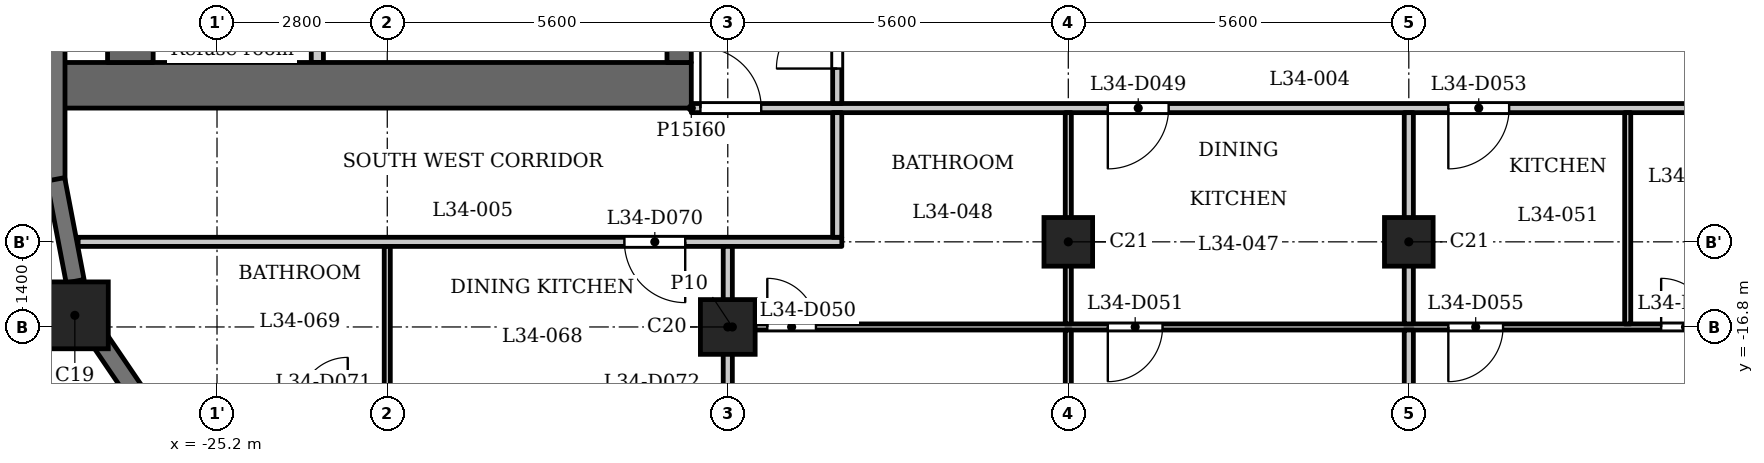
"""IFC4 building model, lengths in metres.
Left out: names, types, materials, properties, quantities, classifications, styles, units other than length and angle.
Written with IfcOpenShell. Run it as: python <this file> out.ifc"""

import sys

from ifc_helpers import new_model, si_unit, direction, frame, frame_2d, origin, origin_2d, place, context, subcontext, project, spatial, rectangle, extrude, element, fill, save


model = new_model("IFC4")
c1 = context("Model", 3, precision=1e-05, world=origin(), true_north=direction((0.0, 1.0)))
c2 = subcontext(c1, "Body", "Model", "MODEL_VIEW")
j1 = project(units=[si_unit("LENGTHUNIT", "METRE"), si_unit("PLANEANGLEUNIT", "RADIAN")], contexts=[c1])
p1 = place(None, origin())
s1 = spatial("IfcSite", under=j1, at=p1, CompositionType="ELEMENT")
p2 = place(p1, origin())
s2 = spatial("IfcBuilding", under=s1, at=p2, CompositionType="ELEMENT")
p3 = place(p2, frame((0.0, 0.0, 136.1)))
s3 = spatial("IfcBuildingStorey", under=s2, at=p3, CompositionType="ELEMENT", Elevation=136.1)
p4 = place(p3, frame((-27.538, -16.609, 0.0), z_axis=(0.0, 0.0, 1.0), x_axis=(1.0, 0.0, 0.0)))
e1 = element("IfcColumn", 1, at=p4, inside=s3, PredefinedType="COLUMN", context=c2, shape_type="SweptSolid", body=[
    extrude(rectangle(XDim=1.1, YDim=1.1, at=origin_2d()), origin(), (0.0, 0.0, 1.0), 3.5),
])
p5 = place(p3, frame((-16.8, -16.8, 0.0), z_axis=(0.0, 0.0, 1.0), x_axis=(1.0, 0.0, 0.0)))
e2 = element("IfcColumn", 2, at=p5, inside=s3, PredefinedType="COLUMN", context=c2, shape_type="SweptSolid", body=[
    extrude(rectangle(XDim=0.9, YDim=0.9, at=origin_2d()), origin(), (0.0, 0.0, 1.0), 3.5),
])
for number, where, z_axis, x_axis in (
    (3, (-11.2, -15.4, 0.0), (0.0, 0.0, 1.0), (1.0, 0.0, 0.0)),
    (4, (-5.6, -15.4, 0.0), (0.0, 0.0, 1.0), (1.0, 0.0, 0.0)),
):
    element("IfcColumn", number, at=place(p3, frame(where, z_axis=z_axis, x_axis=x_axis)), inside=s3, PredefinedType="COLUMN", context=c2, shape_type="SweptSolid", body=[
        extrude(rectangle(XDim=0.8, YDim=0.8, at=origin_2d()), origin(), (0.0, 0.0, 1.0), 3.5),
    ])
p6 = place(p3, frame((-27.85, -11.75, 0.0), z_axis=(0.0, 0.0, 1.0), x_axis=(0.0, -1.0, 0.0)))
e5 = element("IfcWall", 5, at=p6, inside=s3, PredefinedType="SOLIDWALL", context=c2, shape_type="SweptSolid", body=[
    extrude(rectangle(XDim=2.65, YDim=0.3, at=frame_2d((1.325, 0.0))), origin(), (0.0, 0.0, 1.0), 2.45),
])
p7 = place(p3, frame((-27.853, -14.372, 0.0), z_axis=(0.0, 0.0, 1.0), x_axis=(0.187302784601, -0.982302227871, 0.0)))
e6 = element("IfcWall", 6, at=p7, inside=s3, PredefinedType="SOLIDWALL", context=c2, shape_type="SweptSolid", body=[
    extrude(rectangle(XDim=1.706, YDim=0.3, at=frame_2d((0.853, 0.0))), origin(), (0.0, 0.0, 1.0), 2.45),
])
p8 = place(p3, frame((-27.138, -17.002, 0.0), z_axis=(0.0, 0.0, 1.0), x_axis=(0.562075160946, -0.827086158419, 0.0)))
e7 = element("IfcWall", 7, at=p8, inside=s3, PredefinedType="SOLIDWALL", context=c2, shape_type="SweptSolid", body=[
    extrude(rectangle(XDim=1.706, YDim=0.3, at=frame_2d((0.853, 0.0))), origin(), (0.0, 0.0, 1.0), 2.45),
])
p9 = place(p3, frame((-17.4, -12.825, 0.0), z_axis=(0.0, 0.0, 1.0), x_axis=(-1.0, 0.0, 0.0)))
e8 = element("IfcWall", 8, at=p9, inside=s3, PredefinedType="SHEAR", context=c2, shape_type="SweptSolid", body=[
    extrude(rectangle(XDim=10.4, YDim=0.75, at=frame_2d((5.2, 0.0))), origin(), (0.0, 0.0, 1.0), 3.2),
])
p10 = place(p3, frame((-17.6, -12.45, 0.0), z_axis=(0.0, 0.0, 1.0), x_axis=(0.0, 1.0, 0.0)))
e9 = element("IfcWall", 9, at=p10, inside=s3, PredefinedType="SHEAR", context=c2, shape_type="SweptSolid", body=[
    extrude(rectangle(XDim=24.9, YDim=0.4, at=frame_2d((12.45, 0.0))), origin(), (0.0, 0.0, 1.0), 3.2),
])
p11 = place(p10, frame((8.65, 0.0, 0.0)))
e10 = element("IfcOpeningElement", 10, at=p11, cuts=e9, PredefinedType="OPENING", context=c2, shape_type="SweptSolid", body=[
    extrude(rectangle(XDim=0.9, YDim=2.1, at=frame_2d((0.45, 1.05))), frame((0.0, 0.21, 0.0), z_axis=(0.0, -1.0, 0.0), x_axis=(1.0, 0.0, 0.0)), (0.0, 0.0, 1.0), 0.42),
])
p12 = place(p10, frame((15.6, 0.0, 0.0)))
e11 = element("IfcOpeningElement", 11, at=p12, cuts=e9, PredefinedType="OPENING", context=c2, shape_type="SweptSolid", body=[
    extrude(rectangle(XDim=1.1, YDim=2.1, at=frame_2d((0.55, 1.05))), frame((0.0, 0.21, 0.0), z_axis=(0.0, -1.0, 0.0), x_axis=(1.0, 0.0, 0.0)), (0.0, 0.0, 1.0), 0.42),
])
p13 = place(p10, frame((18.0, 0.0, 0.0)))
e12 = element("IfcOpeningElement", 12, at=p13, cuts=e9, PredefinedType="OPENING", context=c2, shape_type="SweptSolid", body=[
    extrude(rectangle(XDim=1.1, YDim=2.1, at=frame_2d((0.55, 1.05))), frame((0.0, 0.21, 0.0), z_axis=(0.0, -1.0, 0.0), x_axis=(1.0, 0.0, 0.0)), (0.0, 0.0, 1.0), 0.42),
])
p14 = place(p10, frame((23.025, 0.0, 0.0)))
e13 = element("IfcOpeningElement", 13, at=p14, cuts=e9, PredefinedType="OPENING", context=c2, shape_type="SweptSolid", body=[
    extrude(rectangle(XDim=1.1, YDim=2.1, at=frame_2d((0.55, 1.05))), frame((0.0, 0.21, 0.0), z_axis=(0.0, -1.0, 0.0), x_axis=(1.0, 0.0, 0.0)), (0.0, 0.0, 1.0), 0.42),
])
p15 = place(p10, frame((0.775, 0.0, 0.0)))
e14 = element("IfcOpeningElement", 14, at=p15, cuts=e9, PredefinedType="OPENING", context=c2, shape_type="SweptSolid", body=[
    extrude(rectangle(XDim=1.1, YDim=2.1, at=frame_2d((0.55, 1.05))), frame((0.0, 0.21, 0.0), z_axis=(0.0, -1.0, 0.0), x_axis=(1.0, 0.0, 0.0)), (0.0, 0.0, 1.0), 0.42),
])
p16 = place(p10, frame((12.925, 0.0, 0.0)))
e15 = element("IfcOpeningElement", 15, at=p16, cuts=e9, PredefinedType="OPENING", context=c2, shape_type="SweptSolid", body=[
    extrude(rectangle(XDim=1.8, YDim=2.1, at=frame_2d((0.9, 1.05))), frame((0.0, 0.21, 0.0), z_axis=(0.0, -1.0, 0.0), x_axis=(1.0, 0.0, 0.0)), (0.0, 0.0, 1.0), 0.42),
])
p17 = place(p3, frame((-26.625, -12.45, 0.0), z_axis=(0.0, 0.0, 1.0), x_axis=(0.0, 1.0, 0.0)))
e16 = element("IfcWall", 16, at=p17, inside=s3, PredefinedType="SHEAR", context=c2, shape_type="SweptSolid", body=[
    extrude(rectangle(XDim=24.9, YDim=0.75, at=frame_2d((12.45, 0.0))), origin(), (0.0, 0.0, 1.0), 3.2),
])
p18 = place(p3, frame((-23.55, -12.45, 0.0), z_axis=(0.0, 0.0, 1.0), x_axis=(0.0, 1.0, 0.0)))
e17 = element("IfcWall", 17, at=p18, inside=s3, PredefinedType="PARTITIONING", context=c2, shape_type="SweptSolid", body=[
    extrude(rectangle(XDim=2.65, YDim=0.2, at=frame_2d((1.325, 0.0))), origin(), (0.0, 0.0, 1.0), 3.2),
])
p19 = place(p18, frame((0.875, 0.0, 0.0)))
e18 = element("IfcOpeningElement", 18, at=p19, cuts=e17, PredefinedType="OPENING", context=c2, shape_type="SweptSolid", body=[
    extrude(rectangle(XDim=0.9, YDim=2.1, at=frame_2d((0.45, 1.05))), frame((0.0, 0.11, 0.0), z_axis=(0.0, -1.0, 0.0), x_axis=(1.0, 0.0, 0.0)), (0.0, 0.0, 1.0), 0.22),
])
p20 = place(p3, frame((-16.725, -16.8, 0.0), z_axis=(0.0, 0.0, 1.0), x_axis=(1.0, 0.0, 0.0)))
e19 = element("IfcWall", 19, at=p20, inside=s3, PredefinedType="PARTITIONING", context=c2, shape_type="SweptSolid", body=[
    extrude(rectangle(XDim=33.45, YDim=0.1, at=frame_2d((16.725, 0.0))), origin(), (0.0, 0.0, 1.0), 3.2),
])
p21 = place(p20, frame((0.575, 0.0, 0.0)))
e20 = element("IfcOpeningElement", 20, at=p21, cuts=e19, PredefinedType="OPENING", context=c2, shape_type="SweptSolid", body=[
    extrude(rectangle(XDim=0.8, YDim=2.1, at=frame_2d((0.4, 1.05))), frame((0.0, 0.06, 0.0), z_axis=(0.0, -1.0, 0.0), x_axis=(1.0, 0.0, 0.0)), (0.0, 0.0, 1.0), 0.12),
])
p22 = place(p20, frame((6.175, 0.0, 0.0)))
e21 = element("IfcOpeningElement", 21, at=p22, cuts=e19, PredefinedType="OPENING", context=c2, shape_type="SweptSolid", body=[
    extrude(rectangle(XDim=0.9, YDim=2.1, at=frame_2d((0.45, 1.05))), frame((0.0, 0.06, 0.0), z_axis=(0.0, -1.0, 0.0), x_axis=(1.0, 0.0, 0.0)), (0.0, 0.0, 1.0), 0.12),
])
p23 = place(p20, frame((15.275, 0.0, 0.0)))
e22 = element("IfcOpeningElement", 22, at=p23, cuts=e19, PredefinedType="OPENING", context=c2, shape_type="SweptSolid", body=[
    extrude(rectangle(XDim=0.8, YDim=2.1, at=frame_2d((0.4, 1.05))), frame((0.0, 0.06, 0.0), z_axis=(0.0, -1.0, 0.0), x_axis=(1.0, 0.0, 0.0)), (0.0, 0.0, 1.0), 0.12),
])
p24 = place(p20, frame((11.775, 0.0, 0.0)))
e23 = element("IfcOpeningElement", 23, at=p24, cuts=e19, PredefinedType="OPENING", context=c2, shape_type="SweptSolid", body=[
    extrude(rectangle(XDim=0.9, YDim=2.1, at=frame_2d((0.45, 1.05))), frame((0.0, 0.06, 0.0), z_axis=(0.0, -1.0, 0.0), x_axis=(1.0, 0.0, 0.0)), (0.0, 0.0, 1.0), 0.12),
])
p25 = place(p20, frame((17.275, 0.0, 0.0)))
e24 = element("IfcOpeningElement", 24, at=p25, cuts=e19, PredefinedType="OPENING", context=c2, shape_type="SweptSolid", body=[
    extrude(rectangle(XDim=0.8, YDim=2.1, at=frame_2d((0.4, 1.05))), frame((0.0, 0.06, 0.0), z_axis=(0.0, -1.0, 0.0), x_axis=(1.0, 0.0, 0.0)), (0.0, 0.0, 1.0), 0.12),
])
p26 = place(p20, frame((20.775, 0.0, 0.0)))
e25 = element("IfcOpeningElement", 25, at=p26, cuts=e19, PredefinedType="OPENING", context=c2, shape_type="SweptSolid", body=[
    extrude(rectangle(XDim=0.9, YDim=2.1, at=frame_2d((0.45, 1.05))), frame((0.0, 0.06, 0.0), z_axis=(0.0, -1.0, 0.0), x_axis=(1.0, 0.0, 0.0)), (0.0, 0.0, 1.0), 0.12),
])
p27 = place(p20, frame((31.575, 0.0, 0.0)))
e26 = element("IfcOpeningElement", 26, at=p27, cuts=e19, PredefinedType="OPENING", context=c2, shape_type="SweptSolid", body=[
    extrude(rectangle(XDim=0.8, YDim=2.1, at=frame_2d((0.4, 1.05))), frame((0.0, 0.06, 0.0), z_axis=(0.0, -1.0, 0.0), x_axis=(1.0, 0.0, 0.0)), (0.0, 0.0, 1.0), 0.12),
])
p28 = place(p20, frame((28.575, 0.0, 0.0)))
e27 = element("IfcOpeningElement", 27, at=p28, cuts=e19, PredefinedType="OPENING", context=c2, shape_type="SweptSolid", body=[
    extrude(rectangle(XDim=0.9, YDim=2.1, at=frame_2d((0.45, 1.05))), frame((0.0, 0.06, 0.0), z_axis=(0.0, -1.0, 0.0), x_axis=(1.0, 0.0, 0.0)), (0.0, 0.0, 1.0), 0.12),
])
p29 = place(p20, frame((23.725, 0.0, 0.0)))
e28 = element("IfcOpeningElement", 28, at=p29, cuts=e19, PredefinedType="OPENING", context=c2, shape_type="SweptSolid", body=[
    extrude(rectangle(XDim=0.9, YDim=2.1, at=frame_2d((0.45, 1.05))), frame((0.0, 0.06, 0.0), z_axis=(0.0, -1.0, 0.0), x_axis=(1.0, 0.0, 0.0)), (0.0, 0.0, 1.0), 0.12),
])
p30 = place(p20, frame((26.225, 0.0, 0.0)))
e29 = element("IfcOpeningElement", 29, at=p30, cuts=e19, PredefinedType="OPENING", context=c2, shape_type="SweptSolid", body=[
    extrude(rectangle(XDim=0.9, YDim=2.1, at=frame_2d((0.45, 1.05))), frame((0.0, 0.06, 0.0), z_axis=(0.0, -1.0, 0.0), x_axis=(1.0, 0.0, 0.0)), (0.0, 0.0, 1.0), 0.12),
])
p31 = place(p3, frame((-27.484, -15.4, 0.0), z_axis=(0.0, 0.0, 1.0), x_axis=(1.0, 0.0, 0.0)))
e30 = element("IfcWall", 30, at=p31, inside=s3, PredefinedType="PARTITIONING", context=c2, shape_type="SweptSolid", body=[
    extrude(rectangle(XDim=12.559, YDim=0.15, at=frame_2d((6.279, 0.0))), origin(), (0.0, 0.0, 1.0), 3.2),
])
p32 = place(p31, frame((8.984, 0.0, 0.0)))
e31 = element("IfcOpeningElement", 31, at=p32, cuts=e30, PredefinedType="OPENING", context=c2, shape_type="SweptSolid", body=[
    extrude(rectangle(XDim=1.0, YDim=2.1, at=frame_2d((0.5, 1.05))), frame((0.0, 0.085, 0.0), z_axis=(0.0, -1.0, 0.0), x_axis=(1.0, 0.0, 0.0)), (0.0, 0.0, 1.0), 0.17),
])
p33 = place(p3, frame((-17.4, -13.2, 0.0), z_axis=(0.0, 0.0, 1.0), x_axis=(1.0, 0.0, 0.0)))
e32 = element("IfcWall", 32, at=p33, inside=s3, PredefinedType="PARTITIONING", context=c2, shape_type="SweptSolid", body=[
    extrude(rectangle(XDim=34.8, YDim=0.15, at=frame_2d((17.4, 0.0))), origin(), (0.0, 0.0, 1.0), 3.2),
])
p34 = place(p33, frame((0.15, 0.0, 0.0)))
e33 = element("IfcOpeningElement", 33, at=p34, cuts=e32, PredefinedType="OPENING", context=c2, shape_type="SweptSolid", body=[
    extrude(rectangle(XDim=1.0, YDim=2.1, at=frame_2d((0.5, 1.05))), frame((0.0, 0.085, 0.0), z_axis=(0.0, -1.0, 0.0), x_axis=(1.0, 0.0, 0.0)), (0.0, 0.0, 1.0), 0.17),
])
p35 = place(p33, frame((33.55, 0.0, 0.0)))
e34 = element("IfcOpeningElement", 34, at=p35, cuts=e32, PredefinedType="OPENING", context=c2, shape_type="SweptSolid", body=[
    extrude(rectangle(XDim=1.0, YDim=2.1, at=frame_2d((0.5, 1.05))), frame((0.0, 0.085, 0.0), z_axis=(0.0, -1.0, 0.0), x_axis=(1.0, 0.0, 0.0)), (0.0, 0.0, 1.0), 0.17),
])
p36 = place(p33, frame((6.85, 0.0, 0.0)))
e35 = element("IfcOpeningElement", 35, at=p36, cuts=e32, PredefinedType="OPENING", context=c2, shape_type="SweptSolid", body=[
    extrude(rectangle(XDim=1.0, YDim=2.1, at=frame_2d((0.5, 1.05))), frame((0.0, 0.085, 0.0), z_axis=(0.0, -1.0, 0.0), x_axis=(1.0, 0.0, 0.0)), (0.0, 0.0, 1.0), 0.17),
])
p37 = place(p33, frame((12.45, 0.0, 0.0)))
e36 = element("IfcOpeningElement", 36, at=p37, cuts=e32, PredefinedType="OPENING", context=c2, shape_type="SweptSolid", body=[
    extrude(rectangle(XDim=1.0, YDim=2.1, at=frame_2d((0.5, 1.05))), frame((0.0, 0.085, 0.0), z_axis=(0.0, -1.0, 0.0), x_axis=(1.0, 0.0, 0.0)), (0.0, 0.0, 1.0), 0.17),
])
p38 = place(p33, frame((21.3, 0.0, 0.0)))
e37 = element("IfcOpeningElement", 37, at=p38, cuts=e32, PredefinedType="OPENING", context=c2, shape_type="SweptSolid", body=[
    extrude(rectangle(XDim=1.0, YDim=2.1, at=frame_2d((0.5, 1.05))), frame((0.0, 0.085, 0.0), z_axis=(0.0, -1.0, 0.0), x_axis=(1.0, 0.0, 0.0)), (0.0, 0.0, 1.0), 0.17),
])
p39 = place(p33, frame((26.9, 0.0, 0.0)))
e38 = element("IfcOpeningElement", 38, at=p39, cuts=e32, PredefinedType="OPENING", context=c2, shape_type="SweptSolid", body=[
    extrude(rectangle(XDim=1.0, YDim=2.1, at=frame_2d((0.5, 1.05))), frame((0.0, 0.085, 0.0), z_axis=(0.0, -1.0, 0.0), x_axis=(1.0, 0.0, 0.0)), (0.0, 0.0, 1.0), 0.17),
])
p40 = place(p3, frame((-22.4, -18.05, 0.0), z_axis=(0.0, 0.0, 1.0), x_axis=(0.0, 1.0, 0.0)))
e39 = element("IfcWall", 39, at=p40, inside=s3, PredefinedType="PARTITIONING", context=c2, shape_type="SweptSolid", body=[
    extrude(rectangle(XDim=2.575, YDim=0.1, at=frame_2d((1.288, 0.0))), origin(), (0.0, 0.0, 1.0), 3.2),
])
p41 = place(p3, frame((-16.8, -22.93, 0.0), z_axis=(0.0, 0.0, 1.0), x_axis=(0.0, 1.0, 0.0)))
e40 = element("IfcWall", 40, at=p41, inside=s3, PredefinedType="PARTITIONING", context=c2, shape_type="SweptSolid", body=[
    extrude(rectangle(XDim=7.455, YDim=0.15, at=frame_2d((3.728, 0.0))), origin(), (0.0, 0.0, 1.0), 3.2),
])
p42 = place(p3, frame((-15.0, -15.325, 0.0), z_axis=(0.0, 0.0, 1.0), x_axis=(0.0, 1.0, 0.0)))
e41 = element("IfcWall", 41, at=p42, inside=s3, PredefinedType="PARTITIONING", context=c2, shape_type="SweptSolid", body=[
    extrude(rectangle(XDim=2.05, YDim=0.15, at=frame_2d((1.025, 0.0))), origin(), (0.0, 0.0, 1.0), 3.2),
])
p43 = place(p3, frame((-15.0, -13.125, 0.0), z_axis=(0.0, 0.0, 1.0), x_axis=(0.0, 1.0, 0.0)))
e42 = element("IfcWall", 42, at=p43, inside=s3, PredefinedType="PARTITIONING", context=c2, shape_type="SweptSolid", body=[
    extrude(rectangle(XDim=6.356, YDim=0.15, at=frame_2d((3.178, 0.0))), origin(), (0.0, 0.0, 1.0), 3.2),
])
p44 = place(p43, frame((0.575, 0.0, 0.0)))
e43 = element("IfcOpeningElement", 43, at=p44, cuts=e42, PredefinedType="OPENING", context=c2, shape_type="SweptSolid", body=[
    extrude(rectangle(XDim=1.0, YDim=2.1, at=frame_2d((0.5, 1.05))), frame((0.0, 0.085, 0.0), z_axis=(0.0, -1.0, 0.0), x_axis=(1.0, 0.0, 0.0)), (0.0, 0.0, 1.0), 0.17),
])
p45 = place(p3, frame((-11.2, -22.93, 0.0), z_axis=(0.0, 0.0, 1.0), x_axis=(0.0, 1.0, 0.0)))
e44 = element("IfcWall", 44, at=p45, inside=s3, PredefinedType="PARTITIONING", context=c2, shape_type="SweptSolid", body=[
    extrude(rectangle(XDim=6.08, YDim=0.1, at=frame_2d((3.04, 0.0))), origin(), (0.0, 0.0, 1.0), 3.2),
])
p46 = place(p45, frame((1.33, 0.0, 0.0)))
e45 = element("IfcOpeningElement", 45, at=p46, cuts=e44, PredefinedType="OPENING", context=c2, shape_type="SweptSolid", body=[
    extrude(rectangle(XDim=0.9, YDim=2.1, at=frame_2d((0.45, 1.05))), frame((0.0, 0.06, 0.0), z_axis=(0.0, -1.0, 0.0), x_axis=(1.0, 0.0, 0.0)), (0.0, 0.0, 1.0), 0.12),
])
p47 = place(p3, frame((-11.2, -16.75, 0.0), z_axis=(0.0, 0.0, 1.0), x_axis=(0.0, 1.0, 0.0)))
e46 = element("IfcWall", 46, at=p47, inside=s3, PredefinedType="PARTITIONING", context=c2, shape_type="SweptSolid", body=[
    extrude(rectangle(XDim=3.475, YDim=0.1, at=frame_2d((1.738, 0.0))), origin(), (0.0, 0.0, 1.0), 3.2),
])
p48 = place(p3, frame((-5.6, -22.93, 0.0), z_axis=(0.0, 0.0, 1.0), x_axis=(0.0, 1.0, 0.0)))
e47 = element("IfcWall", 47, at=p48, inside=s3, PredefinedType="PARTITIONING", context=c2, shape_type="SweptSolid", body=[
    extrude(rectangle(XDim=6.08, YDim=0.15, at=frame_2d((3.04, 0.0))), origin(), (0.0, 0.0, 1.0), 3.2),
])
p49 = place(p3, frame((-5.6, -16.75, 0.0), z_axis=(0.0, 0.0, 1.0), x_axis=(0.0, 1.0, 0.0)))
e48 = element("IfcWall", 48, at=p49, inside=s3, PredefinedType="PARTITIONING", context=c2, shape_type="SweptSolid", body=[
    extrude(rectangle(XDim=3.475, YDim=0.15, at=frame_2d((1.738, 0.0))), origin(), (0.0, 0.0, 1.0), 3.2),
])
p50 = place(p3, frame((-2.0, -16.75, 0.0), z_axis=(0.0, 0.0, 1.0), x_axis=(0.0, 1.0, 0.0)))
e49 = element("IfcWall", 49, at=p50, inside=s3, PredefinedType="PARTITIONING", context=c2, shape_type="SweptSolid", body=[
    extrude(rectangle(XDim=3.475, YDim=0.1, at=frame_2d((1.738, 0.0))), origin(), (0.0, 0.0, 1.0), 3.2),
])
p51 = place(p44, origin())
e50 = element("IfcDoor", 50, at=p51, inside=s3, OperationType="SINGLE_SWING_RIGHT", PredefinedType="DOOR", context=c2, shape_type="SweptSolid", body=[
    extrude(rectangle(XDim=1.0, YDim=2.1, at=frame_2d((0.5, 1.05))), frame((0.0, 0.025, 0.0), z_axis=(0.0, -1.0, 0.0), x_axis=(1.0, 0.0, 0.0)), (0.0, 0.0, 1.0), 0.05),
])
fill(e43, e50)
p52 = place(p34, origin())
e51 = element("IfcDoor", 51, at=p52, inside=s3, OperationType="SINGLE_SWING_RIGHT", PredefinedType="DOOR", context=c2, shape_type="SweptSolid", body=[
    extrude(rectangle(XDim=1.0, YDim=2.1, at=frame_2d((0.5, 1.05))), frame((0.0, 0.025, 0.0), z_axis=(0.0, -1.0, 0.0), x_axis=(1.0, 0.0, 0.0)), (0.0, 0.0, 1.0), 0.05),
])
fill(e33, e51)
p53 = place(p36, origin())
e52 = element("IfcDoor", 52, at=p53, inside=s3, OperationType="SINGLE_SWING_LEFT", PredefinedType="DOOR", context=c2, shape_type="SweptSolid", body=[
    extrude(rectangle(XDim=1.0, YDim=2.1, at=frame_2d((0.5, 1.05))), frame((0.0, 0.025, 0.0), z_axis=(0.0, -1.0, 0.0), x_axis=(1.0, 0.0, 0.0)), (0.0, 0.0, 1.0), 0.05),
])
fill(e35, e52)
p54 = place(p21, origin())
e53 = element("IfcDoor", 53, at=p54, inside=s3, OperationType="SINGLE_SWING_RIGHT", PredefinedType="DOOR", context=c2, shape_type="SweptSolid", body=[
    extrude(rectangle(XDim=0.8, YDim=2.1, at=frame_2d((0.4, 1.05))), frame((0.0, 0.025, 0.0), z_axis=(0.0, -1.0, 0.0), x_axis=(1.0, 0.0, 0.0)), (0.0, 0.0, 1.0), 0.05),
])
fill(e20, e53)
p55 = place(p22, origin())
e54 = element("IfcDoor", 54, at=p55, inside=s3, OperationType="SINGLE_SWING_LEFT", PredefinedType="DOOR", context=c2, shape_type="SweptSolid", body=[
    extrude(rectangle(XDim=0.9, YDim=2.1, at=frame_2d((0.45, 1.05))), frame((0.0, 0.025, 0.0), z_axis=(0.0, -1.0, 0.0), x_axis=(1.0, 0.0, 0.0)), (0.0, 0.0, 1.0), 0.05),
])
fill(e21, e54)
p56 = place(p37, origin())
e55 = element("IfcDoor", 55, at=p56, inside=s3, OperationType="SINGLE_SWING_LEFT", PredefinedType="DOOR", context=c2, shape_type="SweptSolid", body=[
    extrude(rectangle(XDim=1.0, YDim=2.1, at=frame_2d((0.5, 1.05))), frame((0.0, 0.025, 0.0), z_axis=(0.0, -1.0, 0.0), x_axis=(1.0, 0.0, 0.0)), (0.0, 0.0, 1.0), 0.05),
])
fill(e36, e55)
p57 = place(p23, origin())
e56 = element("IfcDoor", 56, at=p57, inside=s3, OperationType="SINGLE_SWING_RIGHT", PredefinedType="DOOR", context=c2, shape_type="SweptSolid", body=[
    extrude(rectangle(XDim=0.8, YDim=2.1, at=frame_2d((0.4, 1.05))), frame((0.0, 0.025, 0.0), z_axis=(0.0, -1.0, 0.0), x_axis=(1.0, 0.0, 0.0)), (0.0, 0.0, 1.0), 0.05),
])
fill(e22, e56)
p58 = place(p24, origin())
e57 = element("IfcDoor", 57, at=p58, inside=s3, OperationType="SINGLE_SWING_LEFT", PredefinedType="DOOR", context=c2, shape_type="SweptSolid", body=[
    extrude(rectangle(XDim=0.9, YDim=2.1, at=frame_2d((0.45, 1.05))), frame((0.0, 0.025, 0.0), z_axis=(0.0, -1.0, 0.0), x_axis=(1.0, 0.0, 0.0)), (0.0, 0.0, 1.0), 0.05),
])
fill(e23, e57)
p59 = place(p32, origin())
e58 = element("IfcDoor", 58, at=p59, inside=s3, OperationType="SINGLE_SWING_RIGHT", PredefinedType="DOOR", context=c2, shape_type="SweptSolid", body=[
    extrude(rectangle(XDim=1.0, YDim=2.1, at=frame_2d((0.5, 1.05))), frame((0.0, 0.025, 0.0), z_axis=(0.0, -1.0, 0.0), x_axis=(1.0, 0.0, 0.0)), (0.0, 0.0, 1.0), 0.05),
])
fill(e31, e58)
save(model, sys.argv[1])
